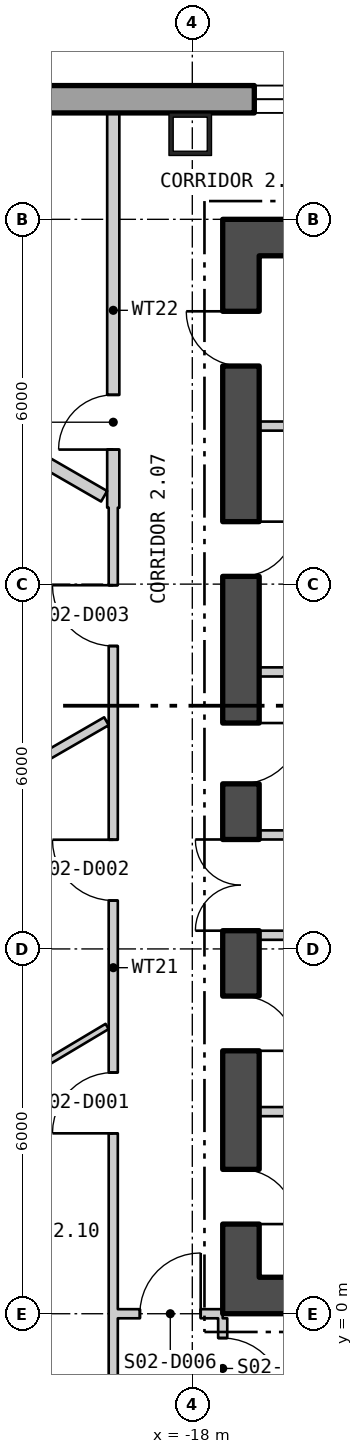
"""IFC4 building model, lengths in metres.
Left out: names, types, materials, properties, quantities, classifications, styles, units other than length and angle.
Written with IfcOpenShell. Run it as: python <this file> out.ifc"""

import sys

from ifc_helpers import new_model, si_unit, direction, frame, frame_2d, origin, origin_2d, place, context, subcontext, project, spatial, polyline, rectangle, hollow_rectangle, outline, extrude, element, fill, save


model = new_model("IFC4")
c1 = context("Model", 3, precision=1e-05, world=origin(), true_north=direction((0.0, 1.0)))
c2 = subcontext(c1, "Body", "Model", "MODEL_VIEW")
j1 = project(units=[si_unit("LENGTHUNIT", "METRE"), si_unit("PLANEANGLEUNIT", "RADIAN")], contexts=[c1])
p1 = place(None, origin())
s1 = spatial("IfcSite", under=j1, at=p1, CompositionType="ELEMENT")
p2 = place(p1, origin())
s2 = spatial("IfcBuilding", under=s1, at=p2, CompositionType="ELEMENT")
p3 = place(p2, frame((0.0, 0.0, 33.3)))
s3 = spatial("IfcBuildingStorey", under=s2, at=p3, CompositionType="ELEMENT", Elevation=33.3)
p4 = place(p3, frame((-18.034, 19.4, 0.0), z_axis=(0.0, 0.0, 1.0), x_axis=(-1.0, 0.0, 0.0)))
e1 = element("IfcColumn", 1, at=p4, inside=s3, PredefinedType="COLUMN", context=c2, shape_type="SweptSolid", body=[
    extrude(hollow_rectangle(XDim=0.7, YDim=0.7, WallThickness=0.07, at=origin_2d()), origin(), (0.0, 0.0, 1.0), 4.5),
])
p5 = place(p3, frame((22.875, 19.975, -0.4), z_axis=(0.0, 0.0, 1.0), x_axis=(-1.0, 0.0, 0.0)))
e2 = element("IfcWall", 2, at=p5, inside=s3, PredefinedType="SOLIDWALL", context=c2, shape_type="SweptSolid", body=[
    extrude(outline(polyline([(-0.13, -0.225), (45.88, -0.225), (45.62, 0.225), (0.13, 0.225), (-0.13, -0.225)])), origin(), (0.0, 0.0, 1.0), 4.5),
])
p6 = place(p5, frame((5.895, 0.0, 1.3)))
e3 = element("IfcOpeningElement", 3, at=p6, cuts=e2, PredefinedType="OPENING", context=c2, shape_type="SweptSolid", body=[
    extrude(rectangle(XDim=2.4, YDim=2.6, at=frame_2d((1.2, 1.3))), frame((0.0, 0.235, 0.0), z_axis=(0.0, -1.0, 0.0), x_axis=(1.0, 0.0, 0.0)), (0.0, 0.0, 1.0), 0.47),
])
p7 = place(p5, frame((10.403, 0.0, 1.3)))
e4 = element("IfcOpeningElement", 4, at=p7, cuts=e2, PredefinedType="OPENING", context=c2, shape_type="SweptSolid", body=[
    extrude(rectangle(XDim=2.4, YDim=2.6, at=frame_2d((1.2, 1.3))), frame((0.0, 0.235, 0.0), z_axis=(0.0, -1.0, 0.0), x_axis=(1.0, 0.0, 0.0)), (0.0, 0.0, 1.0), 0.47),
])
p8 = place(p5, frame((14.912, 0.0, 1.3)))
e5 = element("IfcOpeningElement", 5, at=p8, cuts=e2, PredefinedType="OPENING", context=c2, shape_type="SweptSolid", body=[
    extrude(rectangle(XDim=2.4, YDim=2.6, at=frame_2d((1.2, 1.3))), frame((0.0, 0.235, 0.0), z_axis=(0.0, -1.0, 0.0), x_axis=(1.0, 0.0, 0.0)), (0.0, 0.0, 1.0), 0.47),
])
p9 = place(p5, frame((19.421, 0.0, 1.3)))
e6 = element("IfcOpeningElement", 6, at=p9, cuts=e2, PredefinedType="OPENING", context=c2, shape_type="SweptSolid", body=[
    extrude(rectangle(XDim=2.4, YDim=2.6, at=frame_2d((1.2, 1.3))), frame((0.0, 0.235, 0.0), z_axis=(0.0, -1.0, 0.0), x_axis=(1.0, 0.0, 0.0)), (0.0, 0.0, 1.0), 0.47),
])
p10 = place(p5, frame((23.929, 0.0, 1.3)))
e7 = element("IfcOpeningElement", 7, at=p10, cuts=e2, PredefinedType="OPENING", context=c2, shape_type="SweptSolid", body=[
    extrude(rectangle(XDim=2.4, YDim=2.6, at=frame_2d((1.2, 1.3))), frame((0.0, 0.235, 0.0), z_axis=(0.0, -1.0, 0.0), x_axis=(1.0, 0.0, 0.0)), (0.0, 0.0, 1.0), 0.47),
])
p11 = place(p5, frame((28.438, 0.0, 1.3)))
e8 = element("IfcOpeningElement", 8, at=p11, cuts=e2, PredefinedType="OPENING", context=c2, shape_type="SweptSolid", body=[
    extrude(rectangle(XDim=2.4, YDim=2.6, at=frame_2d((1.2, 1.3))), frame((0.0, 0.235, 0.0), z_axis=(0.0, -1.0, 0.0), x_axis=(1.0, 0.0, 0.0)), (0.0, 0.0, 1.0), 0.47),
])
p12 = place(p5, frame((32.947, 0.0, 1.3)))
e9 = element("IfcOpeningElement", 9, at=p12, cuts=e2, PredefinedType="OPENING", context=c2, shape_type="SweptSolid", body=[
    extrude(rectangle(XDim=2.4, YDim=2.6, at=frame_2d((1.2, 1.3))), frame((0.0, 0.235, 0.0), z_axis=(0.0, -1.0, 0.0), x_axis=(1.0, 0.0, 0.0)), (0.0, 0.0, 1.0), 0.47),
])
p13 = place(p5, frame((37.455, 0.0, 1.3)))
e10 = element("IfcOpeningElement", 10, at=p13, cuts=e2, PredefinedType="OPENING", context=c2, shape_type="SweptSolid", body=[
    extrude(rectangle(XDim=2.4, YDim=2.6, at=frame_2d((1.2, 1.3))), frame((0.0, 0.235, 0.0), z_axis=(0.0, -1.0, 0.0), x_axis=(1.0, 0.0, 0.0)), (0.0, 0.0, 1.0), 0.47),
])
p14 = place(p3, frame((-28.625, 10.015, -0.18), z_axis=(0.0, 0.0, 1.0), x_axis=(0.500000335318, -0.866025210188, 0.0)))
e11 = element("IfcWall", 11, at=p14, inside=s3, PredefinedType="SOLIDWALL", context=c2, shape_type="SweptSolid", body=[
    extrude(outline(polyline([(-0.13, -0.225), (45.88, -0.225), (45.62, 0.225), (0.13, 0.225), (-0.13, -0.225)])), origin(), (0.0, 0.0, 1.0), 4.28),
])
p15 = place(p14, frame((1.425, 0.0, 1.08)))
e12 = element("IfcOpeningElement", 12, at=p15, cuts=e11, PredefinedType="OPENING", context=c2, shape_type="SweptSolid", body=[
    extrude(rectangle(XDim=2.4, YDim=2.6, at=frame_2d((1.2, 1.3))), frame((0.0, 0.235, 0.0), z_axis=(0.0, -1.0, 0.0), x_axis=(1.0, 0.0, 0.0)), (0.0, 0.0, 1.0), 0.47),
])
p16 = place(p14, frame((5.895, 0.0, 1.08)))
e13 = element("IfcOpeningElement", 13, at=p16, cuts=e11, PredefinedType="OPENING", context=c2, shape_type="SweptSolid", body=[
    extrude(rectangle(XDim=2.4, YDim=2.6, at=frame_2d((1.2, 1.3))), frame((0.0, 0.235, 0.0), z_axis=(0.0, -1.0, 0.0), x_axis=(1.0, 0.0, 0.0)), (0.0, 0.0, 1.0), 0.47),
])
p17 = place(p14, frame((10.403, 0.0, 1.08)))
e14 = element("IfcOpeningElement", 14, at=p17, cuts=e11, PredefinedType="OPENING", context=c2, shape_type="SweptSolid", body=[
    extrude(rectangle(XDim=2.4, YDim=2.6, at=frame_2d((1.2, 1.3))), frame((0.0, 0.235, 0.0), z_axis=(0.0, -1.0, 0.0), x_axis=(1.0, 0.0, 0.0)), (0.0, 0.0, 1.0), 0.47),
])
p18 = place(p14, frame((14.912, 0.0, 1.08)))
e15 = element("IfcOpeningElement", 15, at=p18, cuts=e11, PredefinedType="OPENING", context=c2, shape_type="SweptSolid", body=[
    extrude(rectangle(XDim=2.4, YDim=2.6, at=frame_2d((1.2, 1.3))), frame((0.0, 0.235, 0.0), z_axis=(0.0, -1.0, 0.0), x_axis=(1.0, 0.0, 0.0)), (0.0, 0.0, 1.0), 0.47),
])
p19 = place(p14, frame((19.421, 0.0, 1.08)))
e16 = element("IfcOpeningElement", 16, at=p19, cuts=e11, PredefinedType="OPENING", context=c2, shape_type="SweptSolid", body=[
    extrude(rectangle(XDim=2.4, YDim=2.6, at=frame_2d((1.2, 1.3))), frame((0.0, 0.235, 0.0), z_axis=(0.0, -1.0, 0.0), x_axis=(1.0, 0.0, 0.0)), (0.0, 0.0, 1.0), 0.47),
])
p20 = place(p14, frame((23.929, 0.0, 1.08)))
e17 = element("IfcOpeningElement", 17, at=p20, cuts=e11, PredefinedType="OPENING", context=c2, shape_type="SweptSolid", body=[
    extrude(rectangle(XDim=2.4, YDim=2.6, at=frame_2d((1.2, 1.3))), frame((0.0, 0.235, 0.0), z_axis=(0.0, -1.0, 0.0), x_axis=(1.0, 0.0, 0.0)), (0.0, 0.0, 1.0), 0.47),
])
p21 = place(p14, frame((28.438, 0.0, 1.08)))
e18 = element("IfcOpeningElement", 18, at=p21, cuts=e11, PredefinedType="OPENING", context=c2, shape_type="SweptSolid", body=[
    extrude(rectangle(XDim=2.4, YDim=2.6, at=frame_2d((1.2, 1.3))), frame((0.0, 0.235, 0.0), z_axis=(0.0, -1.0, 0.0), x_axis=(1.0, 0.0, 0.0)), (0.0, 0.0, 1.0), 0.47),
])
p22 = place(p14, frame((32.947, 0.0, 1.08)))
e19 = element("IfcOpeningElement", 19, at=p22, cuts=e11, PredefinedType="OPENING", context=c2, shape_type="SweptSolid", body=[
    extrude(rectangle(XDim=2.4, YDim=2.6, at=frame_2d((1.2, 1.3))), frame((0.0, 0.235, 0.0), z_axis=(0.0, -1.0, 0.0), x_axis=(1.0, 0.0, 0.0)), (0.0, 0.0, 1.0), 0.47),
])
p23 = place(p14, frame((37.455, 0.0, 1.08)))
e20 = element("IfcOpeningElement", 20, at=p23, cuts=e11, PredefinedType="OPENING", context=c2, shape_type="SweptSolid", body=[
    extrude(rectangle(XDim=2.4, YDim=2.6, at=frame_2d((1.2, 1.3))), frame((0.0, 0.235, 0.0), z_axis=(0.0, -1.0, 0.0), x_axis=(1.0, 0.0, 0.0)), (0.0, 0.0, 1.0), 0.47),
])
p24 = place(p14, frame((41.925, 0.0, 1.08)))
e21 = element("IfcOpeningElement", 21, at=p24, cuts=e11, PredefinedType="OPENING", context=c2, shape_type="SweptSolid", body=[
    extrude(rectangle(XDim=2.4, YDim=2.6, at=frame_2d((1.2, 1.3))), frame((0.0, 0.235, 0.0), z_axis=(0.0, -1.0, 0.0), x_axis=(1.0, 0.0, 0.0)), (0.0, 0.0, 1.0), 0.47),
])
p25 = place(p3, frame((-17.5, 0.3, 0.0), z_axis=(0.0, 0.0, 1.0), x_axis=(1.0, 0.0, 0.0)))
e22 = element("IfcWall", 22, at=p25, inside=s3, PredefinedType="SHEAR", context=c2, shape_type="SweptSolid", body=[
    extrude(rectangle(XDim=35.0, YDim=0.6, at=frame_2d((17.5, 0.0))), origin(), (0.0, 0.0, 1.0), 4.3),
])
p26 = place(p25, frame((12.0, 0.0, 0.0)))
e23 = element("IfcOpeningElement", 23, at=p26, cuts=e22, PredefinedType="OPENING", context=c2, shape_type="SweptSolid", body=[
    extrude(rectangle(XDim=1.8, YDim=2.4, at=frame_2d((0.9, 1.2))), frame((0.0, 0.31, 0.0), z_axis=(0.0, -1.0, 0.0), x_axis=(1.0, 0.0, 0.0)), (0.0, 0.0, 1.0), 0.62),
])
p27 = place(p25, frame((22.0, 0.0, 0.0)))
e24 = element("IfcOpeningElement", 24, at=p27, cuts=e22, PredefinedType="OPENING", context=c2, shape_type="SweptSolid", body=[
    extrude(rectangle(XDim=1.8, YDim=2.4, at=frame_2d((0.9, 1.2))), frame((0.0, 0.31, 0.0), z_axis=(0.0, -1.0, 0.0), x_axis=(1.0, 0.0, 0.0)), (0.0, 0.0, 1.0), 0.62),
])
p28 = place(p3, frame((-17.5, 17.7, 0.0), z_axis=(0.0, 0.0, 1.0), x_axis=(1.0, 0.0, 0.0)))
e25 = element("IfcWall", 25, at=p28, inside=s3, PredefinedType="SHEAR", context=c2, shape_type="SweptSolid", body=[
    extrude(rectangle(XDim=35.0, YDim=0.6, at=frame_2d((17.5, 0.0))), origin(), (0.0, 0.0, 1.0), 4.3),
])
p29 = place(p3, frame((-17.2, 0.6, 0.0), z_axis=(0.0, 0.0, 1.0), x_axis=(0.0, 1.0, 0.0)))
e26 = element("IfcWall", 26, at=p29, inside=s3, PredefinedType="SHEAR", context=c2, shape_type="SweptSolid", body=[
    extrude(rectangle(XDim=16.8, YDim=0.6, at=frame_2d((8.4, 0.0))), origin(), (0.0, 0.0, 1.0), 4.3),
])
p30 = place(p29, frame((5.7, 0.0, 0.0)))
e27 = element("IfcOpeningElement", 27, at=p30, cuts=e26, PredefinedType="OPENING", context=c2, shape_type="SweptSolid", body=[
    extrude(rectangle(XDim=1.5, YDim=2.1, at=frame_2d((0.75, 1.05))), frame((0.0, 0.31, 0.0), z_axis=(0.0, -1.0, 0.0), x_axis=(1.0, 0.0, 0.0)), (0.0, 0.0, 1.0), 0.62),
])
p31 = place(p29, frame((0.875, 0.0, 0.0)))
e28 = element("IfcOpeningElement", 28, at=p31, cuts=e26, PredefinedType="OPENING", context=c2, shape_type="SweptSolid", body=[
    extrude(rectangle(XDim=0.9, YDim=2.1, at=frame_2d((0.45, 1.05))), frame((0.0, 0.31, 0.0), z_axis=(0.0, -1.0, 0.0), x_axis=(1.0, 0.0, 0.0)), (0.0, 0.0, 1.0), 0.62),
])
p32 = place(p29, frame((3.724, 0.0, 0.0)))
e29 = element("IfcOpeningElement", 29, at=p32, cuts=e26, PredefinedType="OPENING", context=c2, shape_type="SweptSolid", body=[
    extrude(rectangle(XDim=0.9, YDim=2.1, at=frame_2d((0.45, 1.05))), frame((0.0, 0.31, 0.0), z_axis=(0.0, -1.0, 0.0), x_axis=(1.0, 0.0, 0.0)), (0.0, 0.0, 1.0), 0.62),
])
p33 = place(p29, frame((8.115, 0.0, 0.0)))
e30 = element("IfcOpeningElement", 30, at=p33, cuts=e26, PredefinedType="OPENING", context=c2, shape_type="SweptSolid", body=[
    extrude(rectangle(XDim=1.0, YDim=2.1, at=frame_2d((0.5, 1.05))), frame((0.0, 0.31, 0.0), z_axis=(0.0, -1.0, 0.0), x_axis=(1.0, 0.0, 0.0)), (0.0, 0.0, 1.0), 0.62),
])
p34 = place(p29, frame((11.528, 0.0, 0.0)))
e31 = element("IfcOpeningElement", 31, at=p34, cuts=e26, PredefinedType="OPENING", context=c2, shape_type="SweptSolid", body=[
    extrude(rectangle(XDim=0.9, YDim=2.1, at=frame_2d((0.45, 1.05))), frame((0.0, 0.31, 0.0), z_axis=(0.0, -1.0, 0.0), x_axis=(1.0, 0.0, 0.0)), (0.0, 0.0, 1.0), 0.62),
])
p35 = place(p29, frame((14.987, 0.0, 0.0)))
e32 = element("IfcOpeningElement", 32, at=p35, cuts=e26, PredefinedType="OPENING", context=c2, shape_type="SweptSolid", body=[
    extrude(rectangle(XDim=0.9, YDim=2.1, at=frame_2d((0.45, 1.05))), frame((0.0, 0.31, 0.0), z_axis=(0.0, -1.0, 0.0), x_axis=(1.0, 0.0, 0.0)), (0.0, 0.0, 1.0), 0.62),
])
for number, where, z_axis, x_axis in (
    (33, (-16.9, 6.225, 0.0), (0.0, 0.0, 1.0), (1.0, 0.0, 0.0)),
    (34, (-16.9, 7.875, 0.0), (0.0, 0.0, 1.0), (1.0, 0.0, 0.0)),
    (35, (-16.9, 3.324, 0.0), (0.0, 0.0, 1.0), (1.0, 0.0, 0.0)),
    (36, (-16.9, 10.556, 0.0), (0.0, 0.0, 1.0), (1.0, 0.0, 0.0)),
    (37, (-16.9, 14.6, 0.0), (0.0, 0.0, 1.0), (1.0, 0.0, 0.0)),
):
    element("IfcWall", number, at=place(p3, frame(where, z_axis=z_axis, x_axis=x_axis)), inside=s3, PredefinedType="PARTITIONING", context=c2, shape_type="SweptSolid", body=[
        extrude(rectangle(XDim=2.4, YDim=0.15, at=frame_2d((1.2, 0.0))), origin(), (0.0, 0.0, 1.0), 4.3),
    ])
p36 = place(p3, frame((-25.62, 6.161, 0.0), z_axis=(0.0, 0.0, 1.0), x_axis=(0.866036909293, 0.499980071345, 0.0)))
e38 = element("IfcWall", 38, at=p36, inside=s3, PredefinedType="PARTITIONING", context=c2, shape_type="SweptSolid", body=[
    extrude(rectangle(XDim=7.168, YDim=0.15, at=frame_2d((3.584, 0.0))), origin(), (0.0, 0.0, 1.0), 4.3),
])
p37 = place(p3, frame((-24.263, 16.222, 0.0), z_axis=(0.0, 0.0, 1.0), x_axis=(0.86616461284, -0.499758805289, 0.0)))
e39 = element("IfcWall", 39, at=p37, inside=s3, PredefinedType="PARTITIONING", context=c2, shape_type="SweptSolid", body=[
    extrude(rectangle(XDim=5.557, YDim=0.2, at=frame_2d((2.778, 0.0))), origin(), (0.0, 0.0, 1.0), 4.3),
])
p38 = place(p3, frame((-23.41, 2.331, 0.0), z_axis=(0.0, 0.0, 1.0), x_axis=(0.858568146325, 0.512699461786, 0.0)))
e40 = element("IfcWall", 40, at=p38, inside=s3, PredefinedType="PARTITIONING", context=c2, shape_type="SweptSolid", body=[
    extrude(rectangle(XDim=4.669, YDim=0.1, at=frame_2d((2.335, 0.0))), origin(), (0.0, 0.0, 1.0), 4.3),
])
p39 = place(p3, frame((-19.3, -1.875, 0.0), z_axis=(0.0, 0.0, 1.0), x_axis=(0.0, 1.0, 0.0)))
e41 = element("IfcWall", 41, at=p39, inside=s3, PredefinedType="PARTITIONING", context=c2, shape_type="SweptSolid", body=[
    extrude(rectangle(XDim=15.133, YDim=0.15, at=frame_2d((7.566, 0.0))), origin(), (0.0, 0.0, 1.0), 4.3),
])
p40 = place(p39, frame((4.842, 0.0, 0.0)))
e42 = element("IfcOpeningElement", 42, at=p40, cuts=e41, PredefinedType="OPENING", context=c2, shape_type="SweptSolid", body=[
    extrude(rectangle(XDim=1.0, YDim=2.1, at=frame_2d((0.5, 1.05))), frame((0.0, 0.085, 0.0), z_axis=(0.0, -1.0, 0.0), x_axis=(1.0, 0.0, 0.0)), (0.0, 0.0, 1.0), 0.17),
])
p41 = place(p39, frame((8.671, 0.0, 0.0)))
e43 = element("IfcOpeningElement", 43, at=p41, cuts=e41, PredefinedType="OPENING", context=c2, shape_type="SweptSolid", body=[
    extrude(rectangle(XDim=1.0, YDim=2.1, at=frame_2d((0.5, 1.05))), frame((0.0, 0.085, 0.0), z_axis=(0.0, -1.0, 0.0), x_axis=(1.0, 0.0, 0.0)), (0.0, 0.0, 1.0), 0.17),
])
p42 = place(p39, frame((12.857, 0.0, 0.0)))
e44 = element("IfcOpeningElement", 44, at=p42, cuts=e41, PredefinedType="OPENING", context=c2, shape_type="SweptSolid", body=[
    extrude(rectangle(XDim=1.0, YDim=2.1, at=frame_2d((0.5, 1.05))), frame((0.0, 0.085, 0.0), z_axis=(0.0, -1.0, 0.0), x_axis=(1.0, 0.0, 0.0)), (0.0, 0.0, 1.0), 0.17),
])
p43 = place(p3, frame((-19.3, 13.258, 0.0), z_axis=(0.0, 0.0, 1.0), x_axis=(0.0, 1.0, 0.0)))
e45 = element("IfcWall", 45, at=p43, inside=s3, PredefinedType="PARTITIONING", context=c2, shape_type="SweptSolid", body=[
    extrude(rectangle(XDim=6.491, YDim=0.2, at=frame_2d((3.245, 0.0))), origin(), (0.0, 0.0, 1.0), 4.3),
])
p44 = place(p43, frame((0.955, 0.0, 0.0)))
e46 = element("IfcOpeningElement", 46, at=p44, cuts=e45, PredefinedType="OPENING", context=c2, shape_type="SweptSolid", body=[
    extrude(rectangle(XDim=0.9, YDim=2.1, at=frame_2d((0.45, 1.05))), frame((0.0, 0.11, 0.0), z_axis=(0.0, -1.0, 0.0), x_axis=(1.0, 0.0, 0.0)), (0.0, 0.0, 1.0), 0.22),
])
p45 = place(p3, frame((-19.225, 0.0, 0.0), z_axis=(0.0, 0.0, 1.0), x_axis=(1.0, 0.0, 0.0)))
e47 = element("IfcWall", 47, at=p45, inside=s3, PredefinedType="PARTITIONING", context=c2, shape_type="SweptSolid", body=[
    extrude(rectangle(XDim=1.725, YDim=0.15, at=frame_2d((0.863, 0.0))), origin(), (0.0, 0.0, 1.0), 3.61),
])
p46 = place(p45, frame((0.363, 0.0, 0.0)))
e48 = element("IfcOpeningElement", 48, at=p46, cuts=e47, PredefinedType="OPENING", context=c2, shape_type="SweptSolid", body=[
    extrude(rectangle(XDim=1.0, YDim=2.1, at=frame_2d((0.5, 1.05))), frame((0.0, 0.085, 0.0), z_axis=(0.0, -1.0, 0.0), x_axis=(1.0, 0.0, 0.0)), (0.0, 0.0, 1.0), 0.17),
])
p47 = place(p3, frame((-17.5, -1.725, 0.0), z_axis=(0.0, 0.0, 1.0), x_axis=(0.0, 1.0, 0.0)))
e49 = element("IfcWall", 49, at=p47, inside=s3, PredefinedType="PARTITIONING", context=c2, shape_type="SweptSolid", body=[
    extrude(rectangle(XDim=1.65, YDim=0.15, at=frame_2d((0.825, 0.0))), origin(), (0.0, 0.0, 1.0), 4.3),
])
p48 = place(p47, frame((0.325, 0.0, 0.0)))
e50 = element("IfcOpeningElement", 50, at=p48, cuts=e49, PredefinedType="OPENING", context=c2, shape_type="SweptSolid", body=[
    extrude(rectangle(XDim=1.0, YDim=2.1, at=frame_2d((0.5, 1.05))), frame((0.0, 0.085, 0.0), z_axis=(0.0, -1.0, 0.0), x_axis=(1.0, 0.0, 0.0)), (0.0, 0.0, 1.0), 0.17),
])
p49 = place(p13, origin())
e51 = element("IfcWindow", 51, at=p49, inside=s3, PartitioningType="SINGLE_PANEL", PredefinedType="WINDOW", context=c2, shape_type="SweptSolid", body=[
    extrude(rectangle(XDim=2.4, YDim=2.6, at=frame_2d((1.2, 1.3))), frame((0.0, 0.105, 0.0), z_axis=(0.0, -1.0, 0.0), x_axis=(1.0, 0.0, 0.0)), (0.0, 0.0, 1.0), 0.06),
])
fill(e10, e51)
p50 = place(p30, origin())
e52 = element("IfcDoor", 52, at=p50, inside=s3, OperationType="DOUBLE_DOOR_SINGLE_SWING", PredefinedType="DOOR", context=c2, shape_type="SweptSolid", body=[
    extrude(rectangle(XDim=1.5, YDim=2.1, at=frame_2d((0.75, 1.05))), frame((0.0, 0.025, 0.0), z_axis=(0.0, -1.0, 0.0), x_axis=(1.0, 0.0, 0.0)), (0.0, 0.0, 1.0), 0.05),
])
fill(e27, e52)
p51 = place(p31, origin())
e53 = element("IfcDoor", 53, at=p51, inside=s3, OperationType="SINGLE_SWING_LEFT", PredefinedType="DOOR", context=c2, shape_type="SweptSolid", body=[
    extrude(rectangle(XDim=0.9, YDim=2.1, at=frame_2d((0.45, 1.05))), frame((0.0, 0.025, 0.0), z_axis=(0.0, -1.0, 0.0), x_axis=(1.0, 0.0, 0.0)), (0.0, 0.0, 1.0), 0.05),
])
fill(e28, e53)
p52 = place(p32, origin())
e54 = element("IfcDoor", 54, at=p52, inside=s3, OperationType="SINGLE_SWING_LEFT", PredefinedType="DOOR", context=c2, shape_type="SweptSolid", body=[
    extrude(rectangle(XDim=0.9, YDim=2.1, at=frame_2d((0.45, 1.05))), frame((0.0, 0.025, 0.0), z_axis=(0.0, -1.0, 0.0), x_axis=(1.0, 0.0, 0.0)), (0.0, 0.0, 1.0), 0.05),
])
fill(e29, e54)
p53 = place(p33, origin())
e55 = element("IfcDoor", 55, at=p53, inside=s3, OperationType="SINGLE_SWING_RIGHT", PredefinedType="DOOR", context=c2, shape_type="SweptSolid", body=[
    extrude(rectangle(XDim=1.0, YDim=2.1, at=frame_2d((0.5, 1.05))), frame((0.0, 0.025, 0.0), z_axis=(0.0, -1.0, 0.0), x_axis=(1.0, 0.0, 0.0)), (0.0, 0.0, 1.0), 0.05),
])
fill(e30, e55)
p54 = place(p34, origin())
e56 = element("IfcDoor", 56, at=p54, inside=s3, OperationType="SINGLE_SWING_RIGHT", PredefinedType="DOOR", context=c2, shape_type="SweptSolid", body=[
    extrude(rectangle(XDim=0.9, YDim=2.1, at=frame_2d((0.45, 1.05))), frame((0.0, 0.025, 0.0), z_axis=(0.0, -1.0, 0.0), x_axis=(1.0, 0.0, 0.0)), (0.0, 0.0, 1.0), 0.05),
])
fill(e31, e56)
p55 = place(p35, origin())
e57 = element("IfcDoor", 57, at=p55, inside=s3, OperationType="SINGLE_SWING_LEFT", PredefinedType="DOOR", context=c2, shape_type="SweptSolid", body=[
    extrude(rectangle(XDim=0.9, YDim=2.1, at=frame_2d((0.45, 1.05))), frame((0.0, 0.025, 0.0), z_axis=(0.0, -1.0, 0.0), x_axis=(1.0, 0.0, 0.0)), (0.0, 0.0, 1.0), 0.05),
])
fill(e32, e57)
p56 = place(p40, origin())
e58 = element("IfcDoor", 58, at=p56, inside=s3, OperationType="SINGLE_SWING_RIGHT", PredefinedType="DOOR", context=c2, shape_type="SweptSolid", body=[
    extrude(rectangle(XDim=1.0, YDim=2.1, at=frame_2d((0.5, 1.05))), frame((0.0, 0.025, 0.0), z_axis=(0.0, -1.0, 0.0), x_axis=(1.0, 0.0, 0.0)), (0.0, 0.0, 1.0), 0.05),
])
fill(e42, e58)
p57 = place(p41, origin())
e59 = element("IfcDoor", 59, at=p57, inside=s3, OperationType="SINGLE_SWING_LEFT", PredefinedType="DOOR", context=c2, shape_type="SweptSolid", body=[
    extrude(rectangle(XDim=1.0, YDim=2.1, at=frame_2d((0.5, 1.05))), frame((0.0, 0.025, 0.0), z_axis=(0.0, -1.0, 0.0), x_axis=(1.0, 0.0, 0.0)), (0.0, 0.0, 1.0), 0.05),
])
fill(e43, e59)
p58 = place(p42, origin())
e60 = element("IfcDoor", 60, at=p58, inside=s3, OperationType="SINGLE_SWING_LEFT", PredefinedType="DOOR", context=c2, shape_type="SweptSolid", body=[
    extrude(rectangle(XDim=1.0, YDim=2.1, at=frame_2d((0.5, 1.05))), frame((0.0, 0.025, 0.0), z_axis=(0.0, -1.0, 0.0), x_axis=(1.0, 0.0, 0.0)), (0.0, 0.0, 1.0), 0.05),
])
fill(e44, e60)
p59 = place(p44, origin())
e61 = element("IfcDoor", 61, at=p59, inside=s3, OperationType="SINGLE_SWING_RIGHT", PredefinedType="DOOR", context=c2, shape_type="SweptSolid", body=[
    extrude(rectangle(XDim=0.9, YDim=2.1, at=frame_2d((0.45, 1.05))), frame((0.0, 0.025, 0.0), z_axis=(0.0, -1.0, 0.0), x_axis=(1.0, 0.0, 0.0)), (0.0, 0.0, 1.0), 0.05),
])
fill(e46, e61)
p60 = place(p46, origin())
e62 = element("IfcDoor", 62, at=p60, inside=s3, OperationType="SINGLE_SWING_LEFT", PredefinedType="DOOR", context=c2, shape_type="SweptSolid", body=[
    extrude(rectangle(XDim=1.0, YDim=2.1, at=frame_2d((0.5, 1.05))), frame((0.0, 0.025, 0.0), z_axis=(0.0, -1.0, 0.0), x_axis=(1.0, 0.0, 0.0)), (0.0, 0.0, 1.0), 0.05),
])
fill(e48, e62)
p61 = place(p48, origin())
e63 = element("IfcDoor", 63, at=p61, inside=s3, OperationType="SINGLE_SWING_LEFT", PredefinedType="DOOR", context=c2, shape_type="SweptSolid", body=[
    extrude(rectangle(XDim=1.0, YDim=2.1, at=frame_2d((0.5, 1.05))), frame((0.0, 0.025, 0.0), z_axis=(0.0, -1.0, 0.0), x_axis=(1.0, 0.0, 0.0)), (0.0, 0.0, 1.0), 0.05),
])
fill(e50, e63)
save(model, sys.argv[1])
